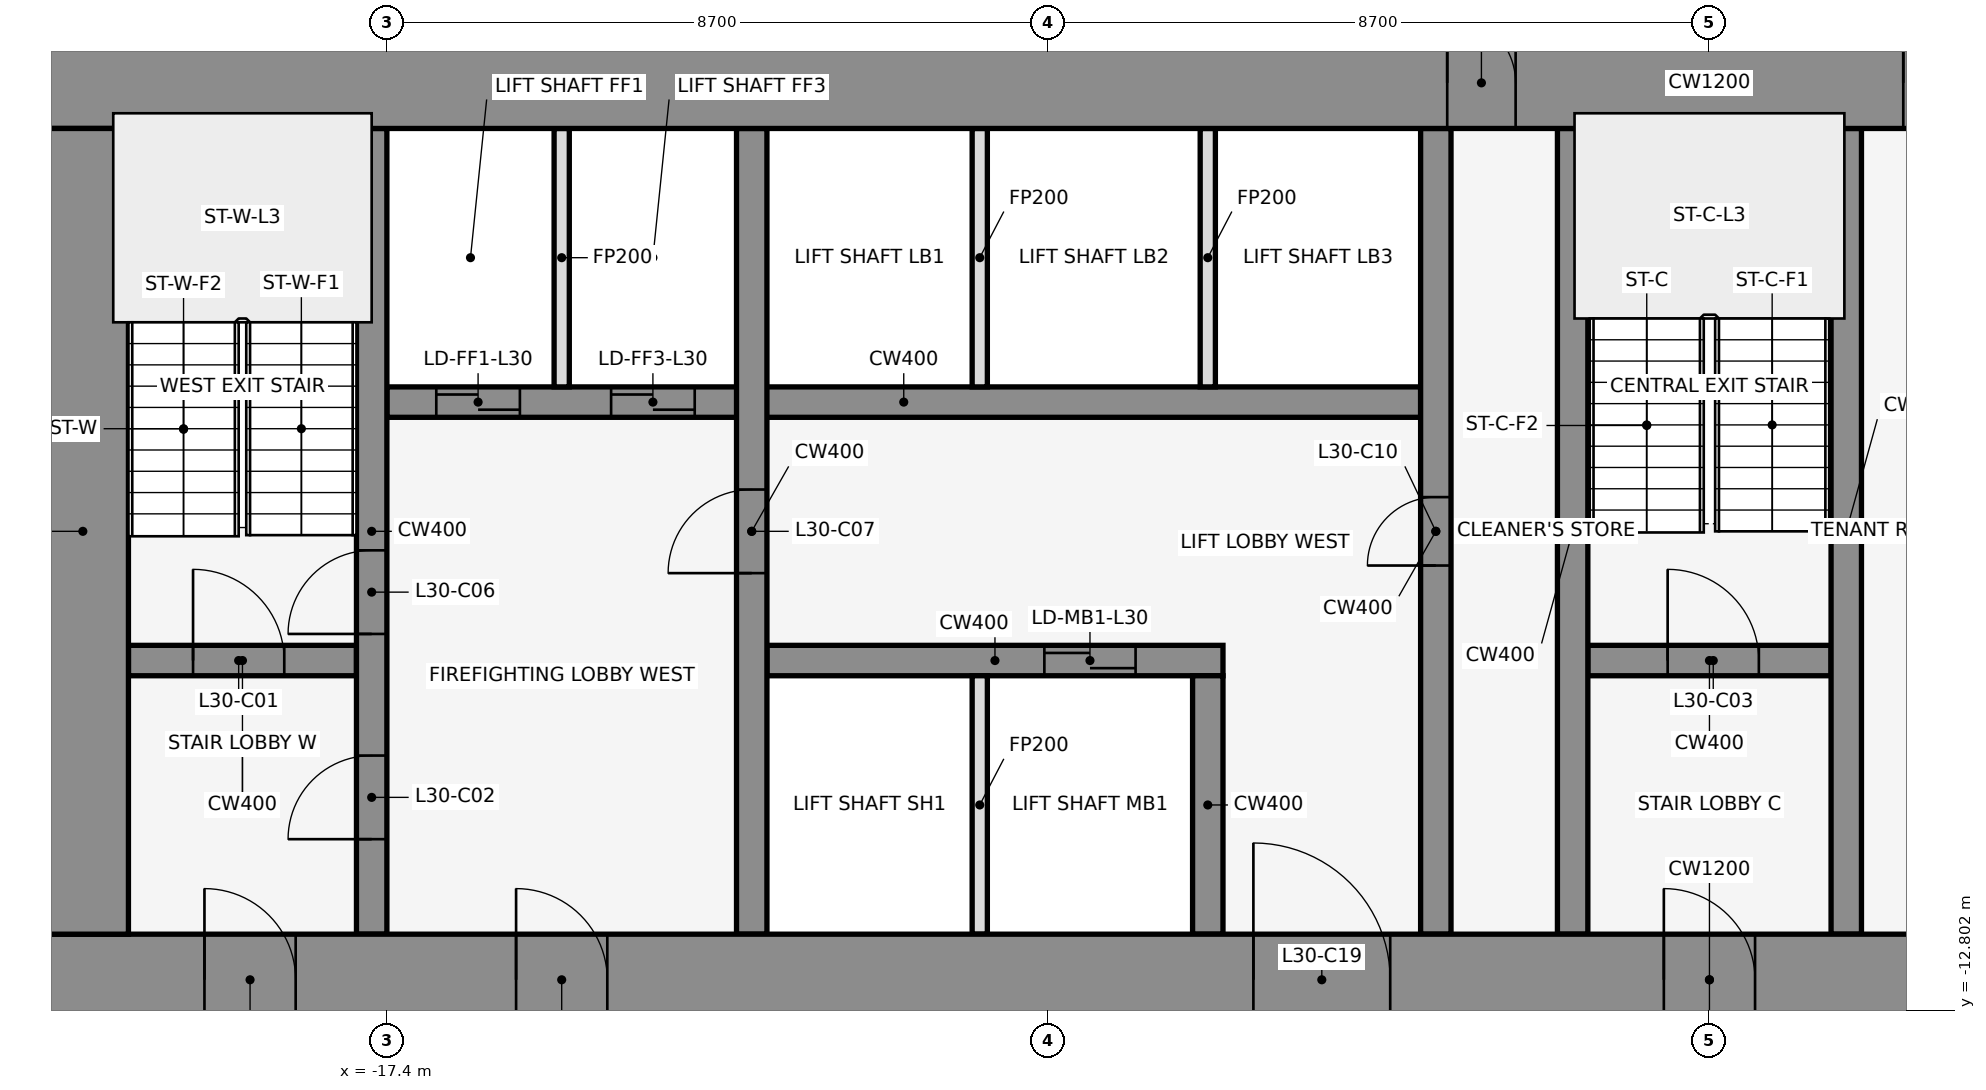
"""IFC4 building model, lengths in metres.
Left out: names, types, materials, properties, quantities, classifications, styles, units other than length and angle.
Written with IfcOpenShell. Run it as: python <this file> out.ifc"""

import sys

from ifc_helpers import new_model, si_unit, direction, frame, frame_2d, origin, place, context, subcontext, project, spatial, rectangle, extrude, element, fill, save


model = new_model("IFC4")
c1 = context("Model", 3, precision=1e-05, world=origin(), true_north=direction((0.0, 1.0)))
c2 = subcontext(c1, "Body", "Model", "MODEL_VIEW")
j1 = project(units=[si_unit("LENGTHUNIT", "METRE"), si_unit("PLANEANGLEUNIT", "RADIAN")], contexts=[c1])
p1 = place(None, origin())
s1 = spatial("IfcSite", under=j1, at=p1, CompositionType="ELEMENT")
p2 = place(p1, origin())
s2 = spatial("IfcBuilding", under=s1, at=p2, CompositionType="ELEMENT")
p3 = place(p2, frame((0.0, 0.0, 140.4)))
s3 = spatial("IfcBuildingStorey", under=s2, at=p3, CompositionType="ELEMENT", Elevation=140.4)
for number, where, z_axis, x_axis in (
    (1, (1.901, 1.08, 0.0), (0.0, 0.0, 1.0), (-0.84, -0.543, 0.0)),
    (2, (-0.068, -0.105, 0.0), (0.0, 0.0, 1.0), (-0.84, 0.543, 0.0)),
    (3, (-14.599, 1.08, 0.0), (0.0, 0.0, 1.0), (-0.84, -0.543, 0.0)),
):
    element("IfcWall", number, at=place(p3, frame(where, z_axis=z_axis, x_axis=x_axis)), inside=s3, PredefinedType="STANDARD", context=c2, shape_type="SweptSolid", body=[
        extrude(rectangle(XDim=2.183, YDim=0.25, at=frame_2d((1.091, 0.0))), origin(), (0.0, 0.0, 1.0), 3.95),
    ])
p4 = place(p3, frame((-20.8, -8.2, 0.0), z_axis=(0.0, 0.0, 1.0), x_axis=(1.0, 0.0, 0.0)))
e4 = element("IfcWall", 4, at=p4, inside=s3, PredefinedType="SHEAR", context=c2, shape_type="SweptSolid", body=[
    extrude(rectangle(XDim=3.0, YDim=0.4, at=frame_2d((1.5, 0.0))), origin(), (0.0, 0.0, 1.0), 4.1),
])
p5 = place(p4, frame((0.85, 0.0, 0.0)))
e5 = element("IfcOpeningElement", 5, at=p5, cuts=e4, PredefinedType="OPENING", context=c2, shape_type="SweptSolid", body=[
    extrude(rectangle(XDim=1.2, YDim=2.1, at=frame_2d((0.6, 1.05))), frame((0.0, 0.212, 0.0), z_axis=(0.0, -1.0, 0.0), x_axis=(1.0, 0.0, 0.0)), (0.0, 0.0, 1.0), 0.424),
])
p6 = place(p3, frame((-12.4, -8.2, 0.0), z_axis=(0.0, 0.0, 1.0), x_axis=(1.0, 0.0, 0.0)))
e6 = element("IfcWall", 6, at=p6, inside=s3, PredefinedType="SHEAR", context=c2, shape_type="SweptSolid", body=[
    extrude(rectangle(XDim=6.0, YDim=0.4, at=frame_2d((3.0, 0.0))), origin(), (0.0, 0.0, 1.0), 4.1),
])
p7 = place(p6, frame((3.65, 0.0, 0.0)))
e7 = element("IfcOpeningElement", 7, at=p7, cuts=e6, PredefinedType="OPENING", context=c2, shape_type="SweptSolid", body=[
    extrude(rectangle(XDim=1.2, YDim=2.1, at=frame_2d((0.6, 1.05))), frame((0.0, 0.212, 0.0), z_axis=(0.0, -1.0, 0.0), x_axis=(1.0, 0.0, 0.0)), (0.0, 0.0, 1.0), 0.424),
])
p8 = place(p3, frame((-1.6, -8.2, 0.0), z_axis=(0.0, 0.0, 1.0), x_axis=(1.0, 0.0, 0.0)))
e8 = element("IfcWall", 8, at=p8, inside=s3, PredefinedType="SHEAR", context=c2, shape_type="SweptSolid", body=[
    extrude(rectangle(XDim=3.2, YDim=0.4, at=frame_2d((1.6, 0.0))), origin(), (0.0, 0.0, 1.0), 4.1),
])
p9 = place(p8, frame((1.05, 0.0, 0.0)))
e9 = element("IfcOpeningElement", 9, at=p9, cuts=e8, PredefinedType="OPENING", context=c2, shape_type="SweptSolid", body=[
    extrude(rectangle(XDim=1.2, YDim=2.1, at=frame_2d((0.6, 1.05))), frame((0.0, 0.212, 0.0), z_axis=(0.0, -1.0, 0.0), x_axis=(1.0, 0.0, 0.0)), (0.0, 0.0, 1.0), 0.424),
])
p10 = place(p3, frame((-17.4, -4.8, 0.0), z_axis=(0.0, 0.0, 1.0), x_axis=(1.0, 0.0, 0.0)))
e10 = element("IfcWall", 10, at=p10, inside=s3, PredefinedType="SHEAR", context=c2, shape_type="SweptSolid", body=[
    extrude(rectangle(XDim=13.6, YDim=0.4, at=frame_2d((6.8, 0.0))), origin(), (0.0, 0.0, 1.0), 4.1),
])
p11 = place(p10, frame((0.65, 0.0, 0.0)))
e11 = element("IfcOpeningElement", 11, at=p11, cuts=e10, PredefinedType="OPENING", context=c2, shape_type="SweptSolid", body=[
    extrude(rectangle(XDim=1.1, YDim=2.1, at=frame_2d((0.55, 1.05))), frame((0.0, 0.212, 0.0), z_axis=(0.0, -1.0, 0.0), x_axis=(1.0, 0.0, 0.0)), (0.0, 0.0, 1.0), 0.424),
])
p12 = place(p10, frame((2.95, 0.0, 0.0)))
e12 = element("IfcOpeningElement", 12, at=p12, cuts=e10, PredefinedType="OPENING", context=c2, shape_type="SweptSolid", body=[
    extrude(rectangle(XDim=1.1, YDim=2.1, at=frame_2d((0.55, 1.05))), frame((0.0, 0.212, 0.0), z_axis=(0.0, -1.0, 0.0), x_axis=(1.0, 0.0, 0.0)), (0.0, 0.0, 1.0), 0.424),
])
p13 = place(p3, frame((-17.6, -11.8, 0.0), z_axis=(0.0, 0.0, 1.0), x_axis=(0.0, 1.0, 0.0)))
e13 = element("IfcWall", 13, at=p13, inside=s3, PredefinedType="SHEAR", context=c2, shape_type="SweptSolid", body=[
    extrude(rectangle(XDim=10.6, YDim=0.4, at=frame_2d((5.3, 0.0))), origin(), (0.0, 0.0, 1.0), 4.1),
])
p14 = place(p13, frame((1.25, 0.0, 0.0)))
e14 = element("IfcOpeningElement", 14, at=p14, cuts=e13, PredefinedType="OPENING", context=c2, shape_type="SweptSolid", body=[
    extrude(rectangle(XDim=1.1, YDim=2.1, at=frame_2d((0.55, 1.05))), frame((0.0, 0.212, 0.0), z_axis=(0.0, -1.0, 0.0), x_axis=(1.0, 0.0, 0.0)), (0.0, 0.0, 1.0), 0.424),
])
p15 = place(p13, frame((3.95, 0.0, 0.0)))
e15 = element("IfcOpeningElement", 15, at=p15, cuts=e13, PredefinedType="OPENING", context=c2, shape_type="SweptSolid", body=[
    extrude(rectangle(XDim=1.1, YDim=2.1, at=frame_2d((0.55, 1.05))), frame((0.0, 0.212, 0.0), z_axis=(0.0, -1.0, 0.0), x_axis=(1.0, 0.0, 0.0)), (0.0, 0.0, 1.0), 0.424),
])
p16 = place(p3, frame((-15.1, -4.6, 0.0), z_axis=(0.0, 0.0, 1.0), x_axis=(0.0, 1.0, 0.0)))
e16 = element("IfcWall", 16, at=p16, inside=s3, PredefinedType="PARTITIONING", context=c2, shape_type="SweptSolid", body=[
    extrude(rectangle(XDim=3.4, YDim=0.2, at=frame_2d((1.7, 0.0))), origin(), (0.0, 0.0, 1.0), 2.939),
])
p17 = place(p3, frame((-12.6, -11.8, 0.0), z_axis=(0.0, 0.0, 1.0), x_axis=(0.0, 1.0, 0.0)))
e17 = element("IfcWall", 17, at=p17, inside=s3, PredefinedType="SHEAR", context=c2, shape_type="SweptSolid", body=[
    extrude(rectangle(XDim=10.6, YDim=0.4, at=frame_2d((5.3, 0.0))), origin(), (0.0, 0.0, 1.0), 4.1),
])
p18 = place(p17, frame((4.75, 0.0, 0.0)))
e18 = element("IfcOpeningElement", 18, at=p18, cuts=e17, PredefinedType="OPENING", context=c2, shape_type="SweptSolid", body=[
    extrude(rectangle(XDim=1.1, YDim=2.1, at=frame_2d((0.55, 1.05))), frame((0.0, 0.212, 0.0), z_axis=(0.0, -1.0, 0.0), x_axis=(1.0, 0.0, 0.0)), (0.0, 0.0, 1.0), 0.424),
])
for number, where, z_axis, x_axis in (
    (19, (-9.6, -11.8, 0.0), (0.0, 0.0, 1.0), (0.0, 1.0, 0.0)),
    (20, (-9.6, -4.6, 0.0), (0.0, 0.0, 1.0), (0.0, 1.0, 0.0)),
):
    element("IfcWall", number, at=place(p3, frame(where, z_axis=z_axis, x_axis=x_axis)), inside=s3, PredefinedType="PARTITIONING", context=c2, shape_type="SweptSolid", body=[
        extrude(rectangle(XDim=3.4, YDim=0.2, at=frame_2d((1.7, 0.0))), origin(), (0.0, 0.0, 1.0), 2.939),
    ])
p19 = place(p3, frame((-6.6, -11.8, 0.0), z_axis=(0.0, 0.0, 1.0), x_axis=(0.0, 1.0, 0.0)))
e21 = element("IfcWall", 21, at=p19, inside=s3, PredefinedType="SHEAR", context=c2, shape_type="SweptSolid", body=[
    extrude(rectangle(XDim=3.4, YDim=0.4, at=frame_2d((1.7, 0.0))), origin(), (0.0, 0.0, 1.0), 4.1),
])
p20 = place(p3, frame((-6.6, -4.6, 0.0), z_axis=(0.0, 0.0, 1.0), x_axis=(0.0, 1.0, 0.0)))
e22 = element("IfcWall", 22, at=p20, inside=s3, PredefinedType="PARTITIONING", context=c2, shape_type="SweptSolid", body=[
    extrude(rectangle(XDim=3.4, YDim=0.2, at=frame_2d((1.7, 0.0))), origin(), (0.0, 0.0, 1.0), 2.939),
])
p21 = place(p3, frame((-3.6, -11.8, 0.0), z_axis=(0.0, 0.0, 1.0), x_axis=(0.0, 1.0, 0.0)))
e23 = element("IfcWall", 23, at=p21, inside=s3, PredefinedType="SHEAR", context=c2, shape_type="SweptSolid", body=[
    extrude(rectangle(XDim=10.6, YDim=0.4, at=frame_2d((5.3, 0.0))), origin(), (0.0, 0.0, 1.0), 4.1),
])
p22 = place(p21, frame((4.85, 0.0, 0.0)))
e24 = element("IfcOpeningElement", 24, at=p22, cuts=e23, PredefinedType="OPENING", context=c2, shape_type="SweptSolid", body=[
    extrude(rectangle(XDim=0.9, YDim=2.1, at=frame_2d((0.45, 1.05))), frame((0.0, 0.212, 0.0), z_axis=(0.0, -1.0, 0.0), x_axis=(1.0, 0.0, 0.0)), (0.0, 0.0, 1.0), 0.424),
])
for number, where, z_axis, x_axis in (
    (25, (-1.8, -11.8, 0.0), (0.0, 0.0, 1.0), (0.0, 1.0, 0.0)),
    (26, (1.8, -11.8, 0.0), (0.0, 0.0, 1.0), (0.0, 1.0, 0.0)),
):
    element("IfcWall", number, at=place(p3, frame(where, z_axis=z_axis, x_axis=x_axis)), inside=s3, PredefinedType="SHEAR", context=c2, shape_type="SweptSolid", body=[
        extrude(rectangle(XDim=10.6, YDim=0.4, at=frame_2d((5.3, 0.0))), origin(), (0.0, 0.0, 1.0), 4.1),
    ])
p23 = place(p3, frame((-22.0, -0.6, 0.0), z_axis=(0.0, 0.0, 1.0), x_axis=(1.0, 0.0, 0.0)))
e27 = element("IfcWall", 27, at=p23, inside=s3, PredefinedType="SHEAR", context=c2, shape_type="SweptSolid", body=[
    extrude(rectangle(XDim=44.0, YDim=1.2, at=frame_2d((22.0, 0.0))), origin(), (0.0, 0.0, 1.0), 4.1),
])
p24 = place(p23, frame((18.55, 0.0, 0.0)))
e28 = element("IfcOpeningElement", 28, at=p24, cuts=e27, PredefinedType="OPENING", context=c2, shape_type="SweptSolid", body=[
    extrude(rectangle(XDim=0.9, YDim=2.1, at=frame_2d((0.45, 1.05))), frame((0.0, 0.612, 0.0), z_axis=(0.0, -1.0, 0.0), x_axis=(1.0, 0.0, 0.0)), (0.0, 0.0, 1.0), 1.224),
])
p25 = place(p23, frame((24.55, 0.0, 0.0)))
e29 = element("IfcOpeningElement", 29, at=p25, cuts=e27, PredefinedType="OPENING", context=c2, shape_type="SweptSolid", body=[
    extrude(rectangle(XDim=0.9, YDim=2.1, at=frame_2d((0.45, 1.05))), frame((0.0, 0.612, 0.0), z_axis=(0.0, -1.0, 0.0), x_axis=(1.0, 0.0, 0.0)), (0.0, 0.0, 1.0), 1.224),
])
p26 = place(p3, frame((-22.0, -12.4, 0.0), z_axis=(0.0, 0.0, 1.0), x_axis=(1.0, 0.0, 0.0)))
e30 = element("IfcWall", 30, at=p26, inside=s3, PredefinedType="SHEAR", context=c2, shape_type="SweptSolid", body=[
    extrude(rectangle(XDim=44.0, YDim=1.2, at=frame_2d((22.0, 0.0))), origin(), (0.0, 0.0, 1.0), 4.1),
])
p27 = place(p26, frame((2.2, 0.0, 0.0)))
e31 = element("IfcOpeningElement", 31, at=p27, cuts=e30, PredefinedType="OPENING", context=c2, shape_type="SweptSolid", body=[
    extrude(rectangle(XDim=1.2, YDim=2.1, at=frame_2d((0.6, 1.05))), frame((0.0, 0.612, 0.0), z_axis=(0.0, -1.0, 0.0), x_axis=(1.0, 0.0, 0.0)), (0.0, 0.0, 1.0), 1.224),
])
p28 = place(p26, frame((21.4, 0.0, 0.0)))
e32 = element("IfcOpeningElement", 32, at=p28, cuts=e30, PredefinedType="OPENING", context=c2, shape_type="SweptSolid", body=[
    extrude(rectangle(XDim=1.2, YDim=2.1, at=frame_2d((0.6, 1.05))), frame((0.0, 0.612, 0.0), z_axis=(0.0, -1.0, 0.0), x_axis=(1.0, 0.0, 0.0)), (0.0, 0.0, 1.0), 1.224),
])
p29 = place(p26, frame((40.6, 0.0, 0.0)))
e33 = element("IfcOpeningElement", 33, at=p29, cuts=e30, PredefinedType="OPENING", context=c2, shape_type="SweptSolid", body=[
    extrude(rectangle(XDim=1.2, YDim=2.1, at=frame_2d((0.6, 1.05))), frame((0.0, 0.612, 0.0), z_axis=(0.0, -1.0, 0.0), x_axis=(1.0, 0.0, 0.0)), (0.0, 0.0, 1.0), 1.224),
])
p30 = place(p26, frame((16.0, 0.0, 0.0)))
e34 = element("IfcOpeningElement", 34, at=p30, cuts=e30, PredefinedType="OPENING", context=c2, shape_type="SweptSolid", body=[
    extrude(rectangle(XDim=1.8, YDim=2.1, at=frame_2d((0.9, 1.05))), frame((0.0, 0.612, 0.0), z_axis=(0.0, -1.0, 0.0), x_axis=(1.0, 0.0, 0.0)), (0.0, 0.0, 1.0), 1.224),
])
p31 = place(p26, frame((6.3, 0.0, 0.0)))
e35 = element("IfcOpeningElement", 35, at=p31, cuts=e30, PredefinedType="OPENING", context=c2, shape_type="SweptSolid", body=[
    extrude(rectangle(XDim=1.2, YDim=2.1, at=frame_2d((0.6, 1.05))), frame((0.0, 0.612, 0.0), z_axis=(0.0, -1.0, 0.0), x_axis=(1.0, 0.0, 0.0)), (0.0, 0.0, 1.0), 1.224),
])
p32 = place(p26, frame((26.2, 0.0, 0.0)))
e36 = element("IfcOpeningElement", 36, at=p32, cuts=e30, PredefinedType="OPENING", context=c2, shape_type="SweptSolid", body=[
    extrude(rectangle(XDim=1.8, YDim=2.1, at=frame_2d((0.9, 1.05))), frame((0.0, 0.612, 0.0), z_axis=(0.0, -1.0, 0.0), x_axis=(1.0, 0.0, 0.0)), (0.0, 0.0, 1.0), 1.224),
])
p33 = place(p26, frame((36.5, 0.0, 0.0)))
e37 = element("IfcOpeningElement", 37, at=p33, cuts=e30, PredefinedType="OPENING", context=c2, shape_type="SweptSolid", body=[
    extrude(rectangle(XDim=1.2, YDim=2.1, at=frame_2d((0.6, 1.05))), frame((0.0, 0.612, 0.0), z_axis=(0.0, -1.0, 0.0), x_axis=(1.0, 0.0, 0.0)), (0.0, 0.0, 1.0), 1.224),
])
p34 = place(p3, frame((-21.4, -11.8, 0.0), z_axis=(0.0, 0.0, 1.0), x_axis=(0.0, 1.0, 0.0)))
e38 = element("IfcWall", 38, at=p34, inside=s3, PredefinedType="SHEAR", context=c2, shape_type="SweptSolid", body=[
    extrude(rectangle(XDim=10.6, YDim=1.2, at=frame_2d((5.3, 0.0))), origin(), (0.0, 0.0, 1.0), 4.1),
])
p35 = place(p5, origin())
e39 = element("IfcDoor", 39, at=p35, inside=s3, OperationType="SINGLE_SWING_LEFT", PredefinedType="DOOR", context=c2, shape_type="SweptSolid", body=[
    extrude(rectangle(XDim=1.2, YDim=2.1, at=frame_2d((0.6, 1.05))), frame((0.0, 0.025, 0.0), z_axis=(0.0, -1.0, 0.0), x_axis=(1.0, 0.0, 0.0)), (0.0, 0.0, 1.0), 0.05),
])
fill(e5, e39)
p36 = place(p14, frame((1.1, 0.0, 0.0), z_axis=(0.0, 0.0, 1.0), x_axis=(-1.0, 0.0, 0.0)))
e40 = element("IfcDoor", 40, at=p36, inside=s3, OperationType="SINGLE_SWING_LEFT", PredefinedType="DOOR", context=c2, shape_type="SweptSolid", body=[
    extrude(rectangle(XDim=1.1, YDim=2.1, at=frame_2d((0.55, 1.05))), frame((0.0, 0.025, 0.0), z_axis=(0.0, -1.0, 0.0), x_axis=(1.0, 0.0, 0.0)), (0.0, 0.0, 1.0), 0.05),
])
fill(e14, e40)
p37 = place(p9, origin())
e41 = element("IfcDoor", 41, at=p37, inside=s3, OperationType="SINGLE_SWING_LEFT", PredefinedType="DOOR", context=c2, shape_type="SweptSolid", body=[
    extrude(rectangle(XDim=1.2, YDim=2.1, at=frame_2d((0.6, 1.05))), frame((0.0, 0.025, 0.0), z_axis=(0.0, -1.0, 0.0), x_axis=(1.0, 0.0, 0.0)), (0.0, 0.0, 1.0), 0.05),
])
fill(e9, e41)
p38 = place(p11, origin())
e42 = element("IfcDoor", 42, at=p38, inside=s3, OperationType="DOUBLE_DOOR_SLIDING", PredefinedType="DOOR", context=c2, shape_type="SweptSolid", body=[
    extrude(rectangle(XDim=1.1, YDim=2.1, at=frame_2d((0.55, 1.05))), frame((0.0, 0.025, 0.0), z_axis=(0.0, -1.0, 0.0), x_axis=(1.0, 0.0, 0.0)), (0.0, 0.0, 1.0), 0.05),
])
fill(e11, e42)
p39 = place(p12, origin())
e43 = element("IfcDoor", 43, at=p39, inside=s3, OperationType="DOUBLE_DOOR_SLIDING", PredefinedType="DOOR", context=c2, shape_type="SweptSolid", body=[
    extrude(rectangle(XDim=1.1, YDim=2.1, at=frame_2d((0.55, 1.05))), frame((0.0, 0.025, 0.0), z_axis=(0.0, -1.0, 0.0), x_axis=(1.0, 0.0, 0.0)), (0.0, 0.0, 1.0), 0.05),
])
fill(e12, e43)
p40 = place(p7, origin())
e44 = element("IfcDoor", 44, at=p40, inside=s3, OperationType="DOUBLE_DOOR_SLIDING", PredefinedType="DOOR", context=c2, shape_type="SweptSolid", body=[
    extrude(rectangle(XDim=1.2, YDim=2.1, at=frame_2d((0.6, 1.05))), frame((0.0, 0.025, 0.0), z_axis=(0.0, -1.0, 0.0), x_axis=(1.0, 0.0, 0.0)), (0.0, 0.0, 1.0), 0.05),
])
fill(e7, e44)
p41 = place(p15, frame((1.1, 0.0, 0.0), z_axis=(0.0, 0.0, 1.0), x_axis=(-1.0, 0.0, 0.0)))
e45 = element("IfcDoor", 45, at=p41, inside=s3, OperationType="SINGLE_SWING_LEFT", PredefinedType="DOOR", context=c2, shape_type="SweptSolid", body=[
    extrude(rectangle(XDim=1.1, YDim=2.1, at=frame_2d((0.55, 1.05))), frame((0.0, 0.025, 0.0), z_axis=(0.0, -1.0, 0.0), x_axis=(1.0, 0.0, 0.0)), (0.0, 0.0, 1.0), 0.05),
])
fill(e15, e45)
p42 = place(p18, origin())
e46 = element("IfcDoor", 46, at=p42, inside=s3, OperationType="SINGLE_SWING_LEFT", PredefinedType="DOOR", context=c2, shape_type="SweptSolid", body=[
    extrude(rectangle(XDim=1.1, YDim=2.1, at=frame_2d((0.55, 1.05))), frame((0.0, 0.025, 0.0), z_axis=(0.0, -1.0, 0.0), x_axis=(1.0, 0.0, 0.0)), (0.0, 0.0, 1.0), 0.05),
])
fill(e18, e46)
p43 = place(p22, frame((0.9, 0.0, 0.0), z_axis=(0.0, 0.0, 1.0), x_axis=(-1.0, 0.0, 0.0)))
e47 = element("IfcDoor", 47, at=p43, inside=s3, OperationType="SINGLE_SWING_LEFT", PredefinedType="DOOR", context=c2, shape_type="SweptSolid", body=[
    extrude(rectangle(XDim=0.9, YDim=2.1, at=frame_2d((0.45, 1.05))), frame((0.0, 0.025, 0.0), z_axis=(0.0, -1.0, 0.0), x_axis=(1.0, 0.0, 0.0)), (0.0, 0.0, 1.0), 0.05),
])
fill(e24, e47)
p44 = place(p24, origin())
e48 = element("IfcDoor", 48, at=p44, inside=s3, OperationType="SINGLE_SWING_LEFT", PredefinedType="DOOR", context=c2, shape_type="SweptSolid", body=[
    extrude(rectangle(XDim=0.9, YDim=2.1, at=frame_2d((0.45, 1.05))), frame((0.0, 0.025, 0.0), z_axis=(0.0, -1.0, 0.0), x_axis=(1.0, 0.0, 0.0)), (0.0, 0.0, 1.0), 0.05),
])
fill(e28, e48)
p45 = place(p25, origin())
e49 = element("IfcDoor", 49, at=p45, inside=s3, OperationType="SINGLE_SWING_LEFT", PredefinedType="DOOR", context=c2, shape_type="SweptSolid", body=[
    extrude(rectangle(XDim=0.9, YDim=2.1, at=frame_2d((0.45, 1.05))), frame((0.0, 0.025, 0.0), z_axis=(0.0, -1.0, 0.0), x_axis=(1.0, 0.0, 0.0)), (0.0, 0.0, 1.0), 0.05),
])
fill(e29, e49)
p46 = place(p27, frame((1.2, 0.0, 0.0), z_axis=(0.0, 0.0, 1.0), x_axis=(-1.0, 0.0, 0.0)))
e50 = element("IfcDoor", 50, at=p46, inside=s3, OperationType="SINGLE_SWING_RIGHT", PredefinedType="DOOR", context=c2, shape_type="SweptSolid", body=[
    extrude(rectangle(XDim=1.2, YDim=2.1, at=frame_2d((0.6, 1.05))), frame((0.0, 0.025, 0.0), z_axis=(0.0, -1.0, 0.0), x_axis=(1.0, 0.0, 0.0)), (0.0, 0.0, 1.0), 0.05),
])
fill(e31, e50)
p47 = place(p28, frame((1.2, 0.0, 0.0), z_axis=(0.0, 0.0, 1.0), x_axis=(-1.0, 0.0, 0.0)))
e51 = element("IfcDoor", 51, at=p47, inside=s3, OperationType="SINGLE_SWING_RIGHT", PredefinedType="DOOR", context=c2, shape_type="SweptSolid", body=[
    extrude(rectangle(XDim=1.2, YDim=2.1, at=frame_2d((0.6, 1.05))), frame((0.0, 0.025, 0.0), z_axis=(0.0, -1.0, 0.0), x_axis=(1.0, 0.0, 0.0)), (0.0, 0.0, 1.0), 0.05),
])
fill(e32, e51)
p48 = place(p30, origin())
e52 = element("IfcDoor", 52, at=p48, inside=s3, OperationType="SINGLE_SWING_LEFT", PredefinedType="DOOR", context=c2, shape_type="SweptSolid", body=[
    extrude(rectangle(XDim=1.8, YDim=2.1, at=frame_2d((0.9, 1.05))), frame((0.0, 0.025, 0.0), z_axis=(0.0, -1.0, 0.0), x_axis=(1.0, 0.0, 0.0)), (0.0, 0.0, 1.0), 0.05),
])
fill(e34, e52)
p49 = place(p31, frame((1.2, 0.0, 0.0), z_axis=(0.0, 0.0, 1.0), x_axis=(-1.0, 0.0, 0.0)))
e53 = element("IfcDoor", 53, at=p49, inside=s3, OperationType="SINGLE_SWING_RIGHT", PredefinedType="DOOR", context=c2, shape_type="SweptSolid", body=[
    extrude(rectangle(XDim=1.2, YDim=2.1, at=frame_2d((0.6, 1.05))), frame((0.0, 0.025, 0.0), z_axis=(0.0, -1.0, 0.0), x_axis=(1.0, 0.0, 0.0)), (0.0, 0.0, 1.0), 0.05),
])
fill(e35, e53)
save(model, sys.argv[1])
